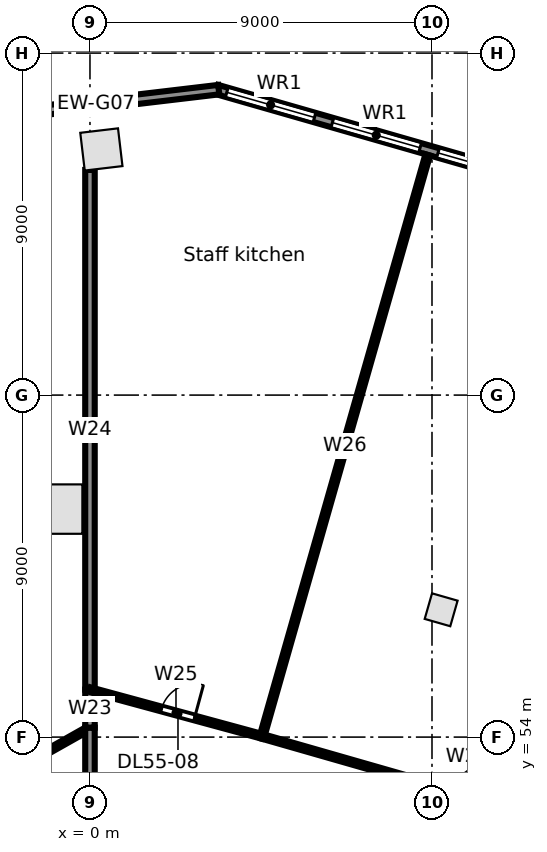
"""IFC4 building model, lengths in metres.
Left out: names, types, materials, properties, quantities, classifications, styles, units other than length and angle.
Written with IfcOpenShell. Run it as: python <this file> out.ifc"""

import sys

from ifc_helpers import new_model, si_unit, direction, frame, frame_2d, origin, origin_2d, place, context, subcontext, project, spatial, rectangle, extrude, element, fill, save


model = new_model("IFC4")
c1 = context("Model", 3, precision=1e-05, world=origin(), true_north=direction((0.0, 1.0)))
c2 = subcontext(c1, "Body", "Model", "MODEL_VIEW")
j1 = project(units=[si_unit("LENGTHUNIT", "METRE"), si_unit("PLANEANGLEUNIT", "RADIAN")], contexts=[c1])
p1 = place(None, origin())
s1 = spatial("IfcSite", under=j1, at=p1, CompositionType="ELEMENT")
p2 = place(p1, origin())
s2 = spatial("IfcBuilding", under=s1, at=p2, CompositionType="ELEMENT")
p3 = place(p2, frame((0.0, 0.0, 250.4)))
s3 = spatial("IfcBuildingStorey", under=s2, at=p3, CompositionType="ELEMENT", Elevation=250.4)
p4 = place(p3, frame((0.3, 69.464, 0.0), z_axis=(0.0, 0.0, 1.0), x_axis=(-0.993068456955, -0.117537397458, 0.0)))
e1 = element("IfcColumn", 1, at=p4, inside=s3, PredefinedType="COLUMN", context=c2, shape_type="SweptSolid", body=[
    extrude(rectangle(XDim=1.0, YDim=1.0, at=origin_2d()), origin(), (0.0, 0.0, 1.0), 3.9),
])
p5 = place(p3, frame((-0.85, 60.0, 0.0), z_axis=(0.0, 0.0, 1.0), x_axis=(0.0, 1.0, 0.0)))
e2 = element("IfcColumn", 2, at=p5, inside=s3, PredefinedType="COLUMN", context=c2, shape_type="SweptSolid", body=[
    extrude(rectangle(XDim=1.3, YDim=1.3, at=origin_2d()), origin(), (0.0, 0.0, 1.0), 3.9),
])
p6 = place(p3, frame((9.241, 57.35, 0.0), z_axis=(0.0, 0.0, 1.0), x_axis=(0.961261695938, -0.275637355817, 0.0)))
e3 = element("IfcColumn", 3, at=p6, inside=s3, PredefinedType="COLUMN", context=c2, shape_type="SweptSolid", body=[
    extrude(rectangle(XDim=0.7, YDim=0.7, at=origin_2d()), origin(), (0.0, 0.0, 1.0), 3.9),
])
p7 = place(p3, frame((3.34, 71.042, 0.0), z_axis=(0.0, 0.0, 1.0), x_axis=(0.96126179431, -0.275637012753, 0.0)))
e4 = element("IfcWall", 4, at=p7, inside=s3, PredefinedType="STANDARD", context=c2, shape_type="SweptSolid", body=[
    extrude(rectangle(XDim=34.779, YDim=0.25, at=frame_2d((17.39, 0.0))), origin(), (0.0, 0.0, 1.0), 3.62),
])
p8 = place(p7, frame((32.071, 0.0, 0.8)))
e5 = element("IfcOpeningElement", 5, at=p8, cuts=e4, PredefinedType="OPENING", context=c2, shape_type="SweptSolid", body=[
    extrude(rectangle(XDim=2.4, YDim=2.2, at=frame_2d((1.2, 1.1))), frame((0.0, 0.135, 0.0), z_axis=(0.0, -1.0, 0.0), x_axis=(1.0, 0.0, 0.0)), (0.0, 0.0, 1.0), 0.27),
])
p9 = place(p7, frame((29.18, 0.0, 0.8)))
e6 = element("IfcOpeningElement", 6, at=p9, cuts=e4, PredefinedType="OPENING", context=c2, shape_type="SweptSolid", body=[
    extrude(rectangle(XDim=2.4, YDim=2.2, at=frame_2d((1.2, 1.1))), frame((0.0, 0.135, 0.0), z_axis=(0.0, -1.0, 0.0), x_axis=(1.0, 0.0, 0.0)), (0.0, 0.0, 1.0), 0.27),
])
p10 = place(p7, frame((26.289, 0.0, 0.8)))
e7 = element("IfcOpeningElement", 7, at=p10, cuts=e4, PredefinedType="OPENING", context=c2, shape_type="SweptSolid", body=[
    extrude(rectangle(XDim=2.4, YDim=2.2, at=frame_2d((1.2, 1.1))), frame((0.0, 0.135, 0.0), z_axis=(0.0, -1.0, 0.0), x_axis=(1.0, 0.0, 0.0)), (0.0, 0.0, 1.0), 0.27),
])
p11 = place(p7, frame((23.398, 0.0, 0.8)))
e8 = element("IfcOpeningElement", 8, at=p11, cuts=e4, PredefinedType="OPENING", context=c2, shape_type="SweptSolid", body=[
    extrude(rectangle(XDim=2.4, YDim=2.2, at=frame_2d((1.2, 1.1))), frame((0.0, 0.135, 0.0), z_axis=(0.0, -1.0, 0.0), x_axis=(1.0, 0.0, 0.0)), (0.0, 0.0, 1.0), 0.27),
])
p12 = place(p7, frame((20.508, 0.0, 0.8)))
e9 = element("IfcOpeningElement", 9, at=p12, cuts=e4, PredefinedType="OPENING", context=c2, shape_type="SweptSolid", body=[
    extrude(rectangle(XDim=2.4, YDim=2.2, at=frame_2d((1.2, 1.1))), frame((0.0, 0.135, 0.0), z_axis=(0.0, -1.0, 0.0), x_axis=(1.0, 0.0, 0.0)), (0.0, 0.0, 1.0), 0.27),
])
p13 = place(p7, frame((17.616, 0.0, 0.8)))
e10 = element("IfcOpeningElement", 10, at=p13, cuts=e4, PredefinedType="OPENING", context=c2, shape_type="SweptSolid", body=[
    extrude(rectangle(XDim=2.4, YDim=2.2, at=frame_2d((1.2, 1.1))), frame((0.0, 0.135, 0.0), z_axis=(0.0, -1.0, 0.0), x_axis=(1.0, 0.0, 0.0)), (0.0, 0.0, 1.0), 0.27),
])
p14 = place(p7, frame((14.726, 0.0, 0.8)))
e11 = element("IfcOpeningElement", 11, at=p14, cuts=e4, PredefinedType="OPENING", context=c2, shape_type="SweptSolid", body=[
    extrude(rectangle(XDim=2.4, YDim=2.2, at=frame_2d((1.2, 1.1))), frame((0.0, 0.135, 0.0), z_axis=(0.0, -1.0, 0.0), x_axis=(1.0, 0.0, 0.0)), (0.0, 0.0, 1.0), 0.27),
])
p15 = place(p7, frame((11.834, 0.0, 0.8)))
e12 = element("IfcOpeningElement", 12, at=p15, cuts=e4, PredefinedType="OPENING", context=c2, shape_type="SweptSolid", body=[
    extrude(rectangle(XDim=2.4, YDim=2.2, at=frame_2d((1.2, 1.1))), frame((0.0, 0.135, 0.0), z_axis=(0.0, -1.0, 0.0), x_axis=(1.0, 0.0, 0.0)), (0.0, 0.0, 1.0), 0.27),
])
p16 = place(p7, frame((8.944, 0.0, 0.8)))
e13 = element("IfcOpeningElement", 13, at=p16, cuts=e4, PredefinedType="OPENING", context=c2, shape_type="SweptSolid", body=[
    extrude(rectangle(XDim=2.4, YDim=2.2, at=frame_2d((1.2, 1.1))), frame((0.0, 0.135, 0.0), z_axis=(0.0, -1.0, 0.0), x_axis=(1.0, 0.0, 0.0)), (0.0, 0.0, 1.0), 0.27),
])
p17 = place(p7, frame((6.052, 0.0, 0.8)))
e14 = element("IfcOpeningElement", 14, at=p17, cuts=e4, PredefinedType="OPENING", context=c2, shape_type="SweptSolid", body=[
    extrude(rectangle(XDim=2.4, YDim=2.2, at=frame_2d((1.2, 1.1))), frame((0.0, 0.135, 0.0), z_axis=(0.0, -1.0, 0.0), x_axis=(1.0, 0.0, 0.0)), (0.0, 0.0, 1.0), 0.27),
])
p18 = place(p7, frame((3.162, 0.0, 0.8)))
e15 = element("IfcOpeningElement", 15, at=p18, cuts=e4, PredefinedType="OPENING", context=c2, shape_type="SweptSolid", body=[
    extrude(rectangle(XDim=2.4, YDim=2.2, at=frame_2d((1.2, 1.1))), frame((0.0, 0.135, 0.0), z_axis=(0.0, -1.0, 0.0), x_axis=(1.0, 0.0, 0.0)), (0.0, 0.0, 1.0), 0.27),
])
p19 = place(p7, frame((0.271, 0.0, 0.8)))
e16 = element("IfcOpeningElement", 16, at=p19, cuts=e4, PredefinedType="OPENING", context=c2, shape_type="SweptSolid", body=[
    extrude(rectangle(XDim=2.4, YDim=2.2, at=frame_2d((1.2, 1.1))), frame((0.0, 0.135, 0.0), z_axis=(0.0, -1.0, 0.0), x_axis=(1.0, 0.0, 0.0)), (0.0, 0.0, 1.0), 0.27),
])
p20 = place(p3, frame((-3.071, 70.273, 0.0), z_axis=(0.0, 0.0, 1.0), x_axis=(0.993064524962, 0.11757061394, 0.0)))
e17 = element("IfcWall", 17, at=p20, inside=s3, PredefinedType="STANDARD", context=c2, shape_type="SweptSolid", body=[
    extrude(rectangle(XDim=6.506, YDim=0.25, at=frame_2d((3.253, 0.0))), origin(), (0.0, 0.0, 1.0), 3.62),
])
p21 = place(p3, frame((-3.709, 52.157, 0.0), z_axis=(0.0, 0.0, 1.0), x_axis=(0.870901087888, 0.491458335075, 0.0)))
e18 = element("IfcWall", 18, at=p21, inside=s3, PredefinedType="PARTITIONING", context=c2, shape_type="SweptSolid", body=[
    extrude(rectangle(XDim=4.259, YDim=0.125, at=frame_2d((2.129, 0.0))), origin(), (0.0, 0.0, 1.0), 2.8),
])
p22 = place(p3, frame((0.0, 49.015, 0.0), z_axis=(0.0, 0.0, 1.0), x_axis=(0.0, 1.0, 0.0)))
e19 = element("IfcWall", 19, at=p22, inside=s3, PredefinedType="PARTITIONING", context=c2, shape_type="SweptSolid", body=[
    extrude(rectangle(XDim=5.235, YDim=0.25, at=frame_2d((2.618, 0.0))), origin(), (0.0, 0.0, 1.0), 3.62),
])
p23 = place(p22, frame((1.7, 0.0, 0.0)))
e20 = element("IfcOpeningElement", 20, at=p23, cuts=e19, PredefinedType="OPENING", context=c2, shape_type="SweptSolid", body=[
    extrude(rectangle(XDim=1.8, YDim=2.1, at=frame_2d((0.9, 1.05))), frame((0.0, 0.135, 0.0), z_axis=(0.0, -1.0, 0.0), x_axis=(1.0, 0.0, 0.0)), (0.0, 0.0, 1.0), 0.27),
])
p24 = place(p3, frame((0.0, 54.25, 0.0), z_axis=(0.0, 0.0, 1.0), x_axis=(0.0, 1.0, 0.0)))
e21 = element("IfcWall", 21, at=p24, inside=s3, PredefinedType="PARTITIONING", context=c2, shape_type="SweptSolid", body=[
    extrude(rectangle(XDim=1.0, YDim=0.25, at=frame_2d((0.5, 0.0))), origin(), (0.0, 0.0, 1.0), 3.62),
])
p25 = place(p3, frame((0.0, 55.25, 0.0), z_axis=(0.0, 0.0, 1.0), x_axis=(0.0, 1.0, 0.0)))
e22 = element("IfcWall", 22, at=p25, inside=s3, PredefinedType="PARTITIONING", context=c2, shape_type="SweptSolid", body=[
    extrude(rectangle(XDim=13.675, YDim=0.25, at=frame_2d((6.837, 0.0))), origin(), (0.0, 0.0, 1.0), 2.8),
])
p26 = place(p3, frame((0.0, 55.25, 0.0), z_axis=(0.0, 0.0, 1.0), x_axis=(0.965016778836, -0.262188132005, 0.0)))
e23 = element("IfcWall", 23, at=p26, inside=s3, PredefinedType="PARTITIONING", context=c2, shape_type="SweptSolid", body=[
    extrude(rectangle(XDim=4.691, YDim=0.125, at=frame_2d((2.346, 0.0))), origin(), (0.0, 0.0, 1.0), 3.62),
])
p27 = place(p26, frame((1.95, 0.0, 0.0)))
e24 = element("IfcOpeningElement", 24, at=p27, cuts=e23, PredefinedType="OPENING", context=c2, shape_type="SweptSolid", body=[
    extrude(rectangle(XDim=0.9, YDim=2.1, at=frame_2d((0.45, 1.05))), frame((0.0, 0.073, 0.0), z_axis=(0.0, -1.0, 0.0), x_axis=(1.0, 0.0, 0.0)), (0.0, 0.0, 1.0), 0.145),
])
p28 = place(p3, frame((4.527, 54.02, 0.0), z_axis=(0.0, 0.0, 1.0), x_axis=(0.274088747086, 0.961704402985, 0.0)))
e25 = element("IfcWall", 25, at=p28, inside=s3, PredefinedType="PARTITIONING", context=c2, shape_type="SweptSolid", body=[
    extrude(rectangle(XDim=15.91, YDim=0.125, at=frame_2d((7.955, 0.0))), origin(), (0.0, 0.0, 1.0), 2.8),
])
p29 = place(p3, frame((4.527, 54.02, 0.0), z_axis=(0.0, 0.0, 1.0), x_axis=(0.961279520283, -0.275575187352, 0.0)))
e26 = element("IfcWall", 26, at=p29, inside=s3, PredefinedType="PARTITIONING", context=c2, shape_type="SweptSolid", body=[
    extrude(rectangle(XDim=11.25, YDim=0.125, at=frame_2d((5.625, 0.0))), origin(), (0.0, 0.0, 1.0), 2.8),
])
p30 = place(p29, frame((5.2, 0.0, 0.0)))
e27 = element("IfcOpeningElement", 27, at=p30, cuts=e26, PredefinedType="OPENING", context=c2, shape_type="SweptSolid", body=[
    extrude(rectangle(XDim=0.9, YDim=2.1, at=frame_2d((0.45, 1.05))), frame((0.0, 0.073, 0.0), z_axis=(0.0, -1.0, 0.0), x_axis=(1.0, 0.0, 0.0)), (0.0, 0.0, 1.0), 0.145),
])
p31 = place(p17, origin())
e28 = element("IfcWindow", 28, at=p31, inside=s3, PartitioningType="SINGLE_PANEL", PredefinedType="WINDOW", context=c2, shape_type="SweptSolid", body=[
    extrude(rectangle(XDim=2.4, YDim=2.2, at=frame_2d((1.2, 1.1))), frame((0.0, 0.03, 0.0), z_axis=(0.0, -1.0, 0.0), x_axis=(1.0, 0.0, 0.0)), (0.0, 0.0, 1.0), 0.06),
])
fill(e14, e28)
p32 = place(p18, origin())
e29 = element("IfcWindow", 29, at=p32, inside=s3, PartitioningType="SINGLE_PANEL", PredefinedType="WINDOW", context=c2, shape_type="SweptSolid", body=[
    extrude(rectangle(XDim=2.4, YDim=2.2, at=frame_2d((1.2, 1.1))), frame((0.0, 0.03, 0.0), z_axis=(0.0, -1.0, 0.0), x_axis=(1.0, 0.0, 0.0)), (0.0, 0.0, 1.0), 0.06),
])
fill(e15, e29)
p33 = place(p19, origin())
e30 = element("IfcWindow", 30, at=p33, inside=s3, PartitioningType="SINGLE_PANEL", PredefinedType="WINDOW", context=c2, shape_type="SweptSolid", body=[
    extrude(rectangle(XDim=2.4, YDim=2.2, at=frame_2d((1.2, 1.1))), frame((0.0, 0.03, 0.0), z_axis=(0.0, -1.0, 0.0), x_axis=(1.0, 0.0, 0.0)), (0.0, 0.0, 1.0), 0.06),
])
fill(e16, e30)
p34 = place(p27, origin())
e31 = element("IfcDoor", 31, at=p34, inside=s3, OperationType="SINGLE_SWING_RIGHT", PredefinedType="DOOR", context=c2, shape_type="SweptSolid", body=[
    extrude(rectangle(XDim=0.9, YDim=2.1, at=frame_2d((0.45, 1.05))), frame((0.0, 0.025, 0.0), z_axis=(0.0, -1.0, 0.0), x_axis=(1.0, 0.0, 0.0)), (0.0, 0.0, 1.0), 0.05),
])
fill(e24, e31)
save(model, sys.argv[1])
